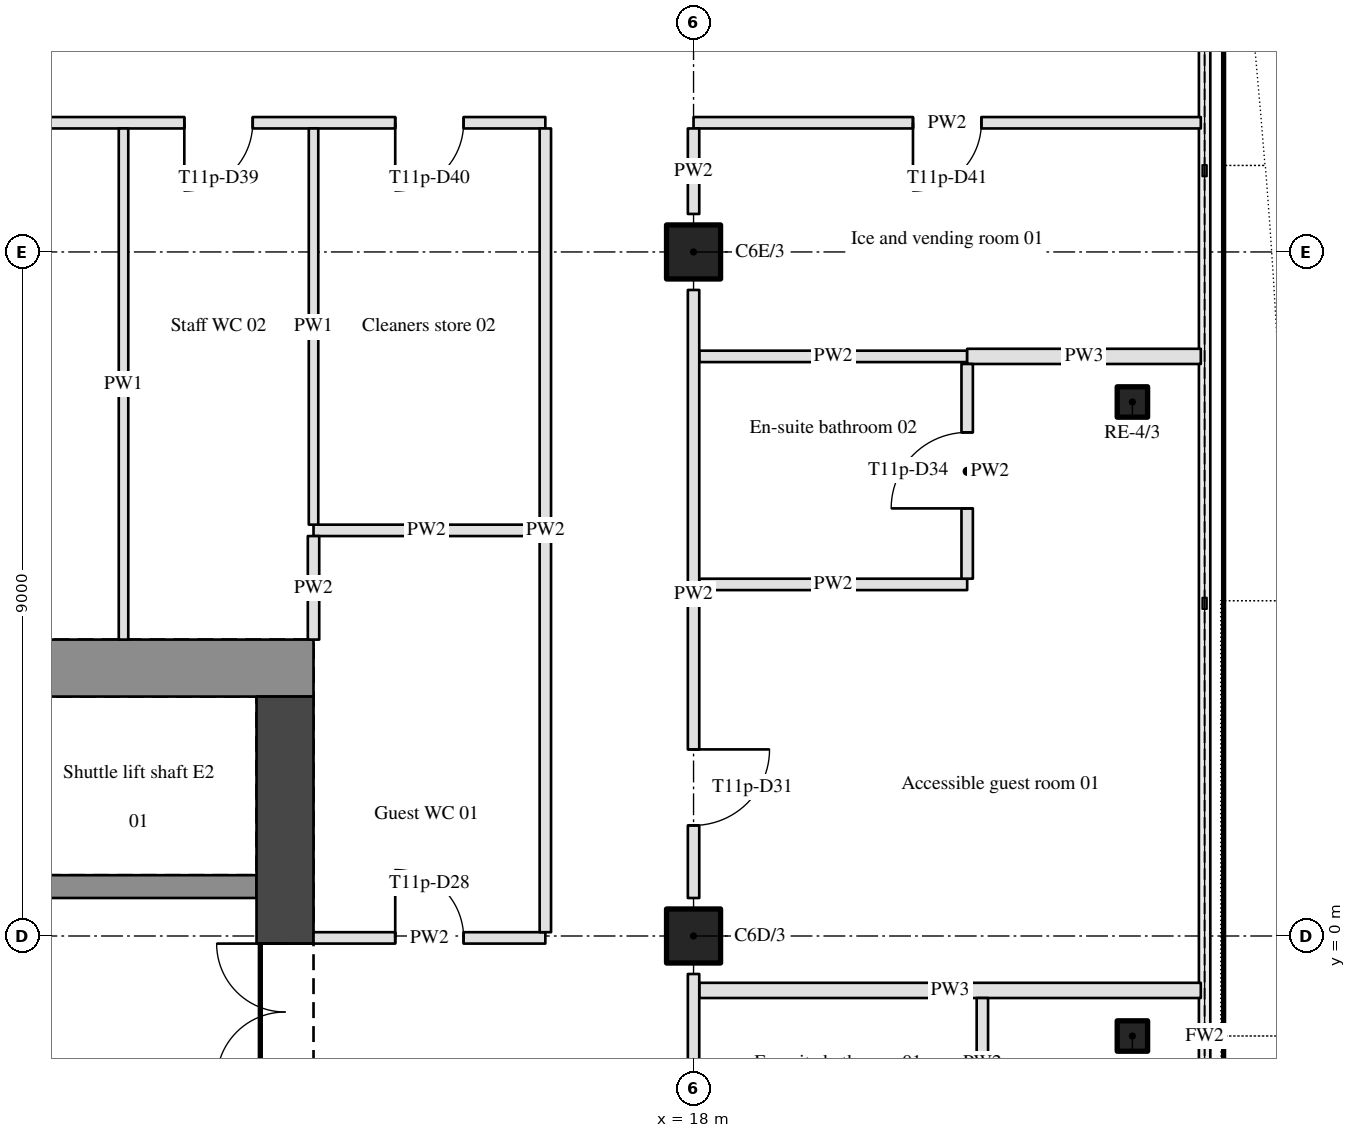
"""IFC4 building model, lengths in metres.
Left out: names, types, materials, properties, quantities, classifications, styles, units other than length and angle.
Written with IfcOpenShell. Run it as: python <this file> out.ifc"""

import sys

from ifc_helpers import new_model, si_unit, direction, frame, frame_2d, origin, origin_2d, place, context, subcontext, project, spatial, rectangle, hollow_rectangle, hollow_circle, extrude, element, fill, save


model = new_model("IFC4")
c1 = context("Model", 3, precision=1e-05, world=origin(), true_north=direction((0.0, 1.0)))
c2 = subcontext(c1, "Body", "Model", "MODEL_VIEW")
j1 = project(units=[si_unit("LENGTHUNIT", "METRE"), si_unit("PLANEANGLEUNIT", "RADIAN")], contexts=[c1])
p1 = place(None, origin())
s1 = spatial("IfcSite", under=j1, at=p1, CompositionType="ELEMENT")
p2 = place(p1, origin())
s2 = spatial("IfcBuilding", under=s1, at=p2, CompositionType="ELEMENT")
p3 = place(p2, frame((0.0, 0.0, 158.9)))
s3 = spatial("IfcBuildingStorey", under=s2, at=p3, CompositionType="ELEMENT", Elevation=158.9)
for number, where, z_axis, x_axis in (
    (1, (18.0, 0.0, 0.0), (0.0, 0.0, 1.0), (1.0, 0.0, 0.0)),
    (2, (18.0, 9.0, 0.0), (0.0, 0.0, 1.0), (1.0, 0.0, 0.0)),
):
    element("IfcColumn", number, at=place(p3, frame(where, z_axis=z_axis, x_axis=x_axis)), inside=s3, PredefinedType="COLUMN", context=c2, shape_type="SweptSolid", body=[
        extrude(hollow_circle(Radius=0.355, WallThickness=0.032, at=origin_2d()), origin(), (0.0, 0.0, 1.0), 3.4),
    ])
for number, where, z_axis, x_axis in (
    (3, (23.774, -1.316, 0.0), (0.0, 0.0, 1.0), (1.0, 0.0, 0.0)),
    (4, (23.774, 7.026, 0.0), (0.0, 0.0, 1.0), (1.0, 0.0, 0.0)),
):
    element("IfcColumn", number, at=place(p3, frame(where, z_axis=z_axis, x_axis=x_axis)), inside=s3, PredefinedType="COLUMN", context=c2, shape_type="SweptSolid", body=[
        extrude(hollow_rectangle(XDim=0.4, YDim=0.4, WallThickness=0.02, InnerFilletRadius=0.03, OuterFilletRadius=0.05, at=origin_2d()), origin(), (0.0, 0.0, 1.0), 3.4),
    ])
p4 = place(p3, frame((-13.0, 3.525, 0.0), z_axis=(0.0, 0.0, 1.0), x_axis=(1.0, 0.0, 0.0)))
e5 = element("IfcWall", 5, at=p4, inside=s3, PredefinedType="SHEAR", context=c2, shape_type="SweptSolid", body=[
    extrude(rectangle(XDim=26.0, YDim=0.75, at=frame_2d((13.0, 0.0))), origin(), (0.0, 0.0, 1.0), 3.4),
])
p5 = place(p3, frame((12.625, -11.5, 0.0), z_axis=(0.0, 0.0, 1.0), x_axis=(0.0, 1.0, 0.0)))
e6 = element("IfcWall", 6, at=p5, inside=s3, PredefinedType="SHEAR", context=c2, shape_type="SweptSolid", body=[
    extrude(rectangle(XDim=14.65, YDim=0.75, at=frame_2d((7.325, 0.0))), origin(), (0.0, 0.0, 1.0), 3.4),
])
p6 = place(p5, frame((9.6, 0.0, 0.0)))
e7 = element("IfcOpeningElement", 7, at=p6, cuts=e6, PredefinedType="OPENING", context=c2, shape_type="SweptSolid", body=[
    extrude(rectangle(XDim=1.8, YDim=2.1, at=frame_2d((0.9, 1.05))), frame((0.0, 0.385, 0.0), z_axis=(0.0, -1.0, 0.0), x_axis=(1.0, 0.0, 0.0)), (0.0, 0.0, 1.0), 0.77),
])
p7 = place(p3, frame((18.075, -0.716, 0.0), z_axis=(0.0, 0.0, 1.0), x_axis=(1.0, 0.0, 0.0)))
e8 = element("IfcWall", 8, at=p7, inside=s3, PredefinedType="PARTITIONING", context=c2, shape_type="SweptSolid", body=[
    extrude(rectangle(XDim=6.599, YDim=0.2, at=frame_2d((3.3, 0.0))), origin(), (0.0, 0.0, 1.0), 2.46),
])
p8 = place(p3, frame((13.0, -0.025, 0.0), z_axis=(0.0, 0.0, 1.0), x_axis=(1.0, 0.0, 0.0)))
e9 = element("IfcWall", 9, at=p8, inside=s3, PredefinedType="PARTITIONING", context=c2, shape_type="SweptSolid", body=[
    extrude(rectangle(XDim=3.05, YDim=0.15, at=frame_2d((1.525, 0.0))), origin(), (0.0, 0.0, 1.0), 2.46),
])
p9 = place(p8, frame((1.075, 0.0, 0.0)))
e10 = element("IfcOpeningElement", 10, at=p9, cuts=e9, PredefinedType="OPENING", context=c2, shape_type="SweptSolid", body=[
    extrude(rectangle(XDim=0.9, YDim=2.1, at=frame_2d((0.45, 1.05))), frame((0.0, 0.085, 0.0), z_axis=(0.0, -1.0, 0.0), x_axis=(1.0, 0.0, 0.0)), (0.0, 0.0, 1.0), 0.17),
])
p10 = place(p3, frame((12.25, 0.65, 0.0), z_axis=(0.0, 0.0, 1.0), x_axis=(-1.0, 0.0, 0.0)))
e11 = element("IfcWall", 11, at=p10, inside=s3, PredefinedType="SHEAR", context=c2, shape_type="SweptSolid", body=[
    extrude(rectangle(XDim=3.25, YDim=0.3, at=frame_2d((1.625, 0.0))), origin(), (0.0, 0.0, 1.0), 3.4),
])
p11 = place(p3, frame((18.075, 4.626, 0.0), z_axis=(0.0, 0.0, 1.0), x_axis=(1.0, 0.0, 0.0)))
e12 = element("IfcWall", 12, at=p11, inside=s3, PredefinedType="PARTITIONING", context=c2, shape_type="SweptSolid", body=[
    extrude(rectangle(XDim=3.525, YDim=0.15, at=frame_2d((1.763, 0.0))), origin(), (0.0, 0.0, 1.0), 2.46),
])
p12 = place(p3, frame((13.0, 5.337, 0.0), z_axis=(0.0, 0.0, 1.0), x_axis=(1.0, 0.0, 0.0)))
e13 = element("IfcWall", 13, at=p12, inside=s3, PredefinedType="PARTITIONING", context=c2, shape_type="SweptSolid", body=[
    extrude(rectangle(XDim=2.975, YDim=0.15, at=frame_2d((1.488, 0.0))), origin(), (0.0, 0.0, 1.0), 2.46),
])
p13 = place(p3, frame((18.075, 7.626, 0.0), z_axis=(0.0, 0.0, 1.0), x_axis=(1.0, 0.0, 0.0)))
e14 = element("IfcWall", 14, at=p13, inside=s3, PredefinedType="PARTITIONING", context=c2, shape_type="SweptSolid", body=[
    extrude(rectangle(XDim=3.525, YDim=0.15, at=frame_2d((1.763, 0.0))), origin(), (0.0, 0.0, 1.0), 2.46),
])
p14 = place(p3, frame((21.6, 7.626, 0.0), z_axis=(0.0, 0.0, 1.0), x_axis=(1.0, 0.0, 0.0)))
e15 = element("IfcWall", 15, at=p14, inside=s3, PredefinedType="PARTITIONING", context=c2, shape_type="SweptSolid", body=[
    extrude(rectangle(XDim=3.074, YDim=0.2, at=frame_2d((1.537, 0.0))), origin(), (0.0, 0.0, 1.0), 2.46),
])
p15 = place(p3, frame((16.05, 10.7, 0.0), z_axis=(0.0, 0.0, 1.0), x_axis=(-1.0, 0.0, 0.0)))
e16 = element("IfcWall", 16, at=p15, inside=s3, PredefinedType="PARTITIONING", context=c2, shape_type="SweptSolid", body=[
    extrude(rectangle(XDim=23.2, YDim=0.15, at=frame_2d((11.6, 0.0))), origin(), (0.0, 0.0, 1.0), 2.46),
])
p16 = place(p15, frame((19.125, 0.0, 0.0)))
e17 = element("IfcOpeningElement", 17, at=p16, cuts=e16, PredefinedType="OPENING", context=c2, shape_type="SweptSolid", body=[
    extrude(rectangle(XDim=1.0, YDim=2.1, at=frame_2d((0.5, 1.05))), frame((0.0, 0.085, 0.0), z_axis=(0.0, -1.0, 0.0), x_axis=(1.0, 0.0, 0.0)), (0.0, 0.0, 1.0), 0.17),
])
p17 = place(p15, frame((10.35, 0.0, 0.0)))
e18 = element("IfcOpeningElement", 18, at=p17, cuts=e16, PredefinedType="OPENING", context=c2, shape_type="SweptSolid", body=[
    extrude(rectangle(XDim=0.9, YDim=2.1, at=frame_2d((0.45, 1.05))), frame((0.0, 0.085, 0.0), z_axis=(0.0, -1.0, 0.0), x_axis=(1.0, 0.0, 0.0)), (0.0, 0.0, 1.0), 0.17),
])
p18 = place(p15, frame((3.85, 0.0, 0.0)))
e19 = element("IfcOpeningElement", 19, at=p18, cuts=e16, PredefinedType="OPENING", context=c2, shape_type="SweptSolid", body=[
    extrude(rectangle(XDim=0.9, YDim=2.1, at=frame_2d((0.45, 1.05))), frame((0.0, 0.085, 0.0), z_axis=(0.0, -1.0, 0.0), x_axis=(1.0, 0.0, 0.0)), (0.0, 0.0, 1.0), 0.17),
])
p19 = place(p15, frame((1.075, 0.0, 0.0)))
e20 = element("IfcOpeningElement", 20, at=p19, cuts=e16, PredefinedType="OPENING", context=c2, shape_type="SweptSolid", body=[
    extrude(rectangle(XDim=0.9, YDim=2.1, at=frame_2d((0.45, 1.05))), frame((0.0, 0.085, 0.0), z_axis=(0.0, -1.0, 0.0), x_axis=(1.0, 0.0, 0.0)), (0.0, 0.0, 1.0), 0.17),
])
p20 = place(p3, frame((24.674, 10.7, 0.0), z_axis=(0.0, 0.0, 1.0), x_axis=(-1.0, 0.0, 0.0)))
e21 = element("IfcWall", 21, at=p20, inside=s3, PredefinedType="PARTITIONING", context=c2, shape_type="SweptSolid", body=[
    extrude(rectangle(XDim=6.674, YDim=0.15, at=frame_2d((3.337, 0.0))), origin(), (0.0, 0.0, 1.0), 2.46),
])
p21 = place(p20, frame((2.887, 0.0, 0.0)))
e22 = element("IfcOpeningElement", 22, at=p21, cuts=e21, PredefinedType="OPENING", context=c2, shape_type="SweptSolid", body=[
    extrude(rectangle(XDim=0.9, YDim=2.1, at=frame_2d((0.45, 1.05))), frame((0.0, 0.085, 0.0), z_axis=(0.0, -1.0, 0.0), x_axis=(1.0, 0.0, 0.0)), (0.0, 0.0, 1.0), 0.17),
])
p22 = place(p3, frame((10.5, 3.9, 0.0), z_axis=(0.0, 0.0, 1.0), x_axis=(0.0, 1.0, 0.0)))
e23 = element("IfcWall", 23, at=p22, inside=s3, PredefinedType="PARTITIONING", context=c2, shape_type="SweptSolid", body=[
    extrude(rectangle(XDim=6.725, YDim=0.125, at=frame_2d((3.363, 0.0))), origin(), (0.0, 0.0, 1.0), 2.46),
])
p23 = place(p3, frame((13.0, 3.9, 0.0), z_axis=(0.0, 0.0, 1.0), x_axis=(0.0, 1.0, 0.0)))
e24 = element("IfcWall", 24, at=p23, inside=s3, PredefinedType="PARTITIONING", context=c2, shape_type="SweptSolid", body=[
    extrude(rectangle(XDim=1.362, YDim=0.15, at=frame_2d((0.681, 0.0))), origin(), (0.0, 0.0, 1.0), 2.46),
])
p24 = place(p3, frame((13.0, 5.412, 0.0), z_axis=(0.0, 0.0, 1.0), x_axis=(0.0, 1.0, 0.0)))
e25 = element("IfcWall", 25, at=p24, inside=s3, PredefinedType="PARTITIONING", context=c2, shape_type="SweptSolid", body=[
    extrude(rectangle(XDim=5.213, YDim=0.125, at=frame_2d((2.606, 0.0))), origin(), (0.0, 0.0, 1.0), 2.46),
])
p25 = place(p3, frame((16.05, 0.05, 0.0), z_axis=(0.0, 0.0, 1.0), x_axis=(0.0, 1.0, 0.0)))
e26 = element("IfcWall", 26, at=p25, inside=s3, PredefinedType="PARTITIONING", context=c2, shape_type="SweptSolid", body=[
    extrude(rectangle(XDim=10.575, YDim=0.15, at=frame_2d((5.288, 0.0))), origin(), (0.0, 0.0, 1.0), 2.46),
])
p26 = place(p3, frame((18.0, -0.5, 0.0), z_axis=(0.0, 0.0, 1.0), x_axis=(0.0, -1.0, 0.0)))
e27 = element("IfcWall", 27, at=p26, inside=s3, PredefinedType="PARTITIONING", context=c2, shape_type="SweptSolid", body=[
    extrude(rectangle(XDim=8.0, YDim=0.15, at=frame_2d((4.0, 0.0))), origin(), (0.0, 0.0, 1.0), 2.46),
])
p27 = place(p26, frame((5.448, 0.0, 0.0)))
e28 = element("IfcOpeningElement", 28, at=p27, cuts=e27, PredefinedType="OPENING", context=c2, shape_type="SweptSolid", body=[
    extrude(rectangle(XDim=1.8, YDim=2.1, at=frame_2d((0.9, 1.05))), frame((0.0, 0.085, 0.0), z_axis=(0.0, -1.0, 0.0), x_axis=(1.0, 0.0, 0.0)), (0.0, 0.0, 1.0), 0.17),
])
p28 = place(p3, frame((18.0, 8.5, 0.0), z_axis=(0.0, 0.0, 1.0), x_axis=(0.0, -1.0, 0.0)))
e29 = element("IfcWall", 29, at=p28, inside=s3, PredefinedType="PARTITIONING", context=c2, shape_type="SweptSolid", body=[
    extrude(rectangle(XDim=8.0, YDim=0.15, at=frame_2d((4.0, 0.0))), origin(), (0.0, 0.0, 1.0), 2.46),
])
p29 = place(p28, frame((6.045, 0.0, 0.0)))
e30 = element("IfcOpeningElement", 30, at=p29, cuts=e29, PredefinedType="OPENING", context=c2, shape_type="SweptSolid", body=[
    extrude(rectangle(XDim=1.0, YDim=2.1, at=frame_2d((0.5, 1.05))), frame((0.0, 0.085, 0.0), z_axis=(0.0, -1.0, 0.0), x_axis=(1.0, 0.0, 0.0)), (0.0, 0.0, 1.0), 0.17),
])
p30 = place(p3, frame((18.0, 9.5, 0.0), z_axis=(0.0, 0.0, 1.0), x_axis=(0.0, 1.0, 0.0)))
e31 = element("IfcWall", 31, at=p30, inside=s3, PredefinedType="PARTITIONING", context=c2, shape_type="SweptSolid", body=[
    extrude(rectangle(XDim=1.125, YDim=0.15, at=frame_2d((0.562, 0.0))), origin(), (0.0, 0.0, 1.0), 2.46),
])
p31 = place(p3, frame((21.6, 4.701, 0.0), z_axis=(0.0, 0.0, 1.0), x_axis=(0.0, 1.0, 0.0)))
e32 = element("IfcWall", 32, at=p31, inside=s3, PredefinedType="PARTITIONING", context=c2, shape_type="SweptSolid", body=[
    extrude(rectangle(XDim=2.825, YDim=0.15, at=frame_2d((1.413, 0.0))), origin(), (0.0, 0.0, 1.0), 2.46),
])
p32 = place(p31, frame((0.925, 0.0, 0.0)))
e33 = element("IfcOpeningElement", 33, at=p32, cuts=e32, PredefinedType="OPENING", context=c2, shape_type="SweptSolid", body=[
    extrude(rectangle(XDim=1.0, YDim=2.1, at=frame_2d((0.5, 1.05))), frame((0.0, 0.085, 0.0), z_axis=(0.0, -1.0, 0.0), x_axis=(1.0, 0.0, 0.0)), (0.0, 0.0, 1.0), 0.17),
])
p33 = place(p3, frame((21.8, -3.641, 0.0), z_axis=(0.0, 0.0, 1.0), x_axis=(0.0, 1.0, 0.0)))
e34 = element("IfcWall", 34, at=p33, inside=s3, PredefinedType="PARTITIONING", context=c2, shape_type="SweptSolid", body=[
    extrude(rectangle(XDim=2.825, YDim=0.15, at=frame_2d((1.413, 0.0))), origin(), (0.0, 0.0, 1.0), 2.46),
])
p34 = place(p33, frame((0.975, 0.0, 0.0)))
e35 = element("IfcOpeningElement", 35, at=p34, cuts=e34, PredefinedType="OPENING", context=c2, shape_type="SweptSolid", body=[
    extrude(rectangle(XDim=0.9, YDim=2.1, at=frame_2d((0.45, 1.05))), frame((0.0, 0.085, 0.0), z_axis=(0.0, -1.0, 0.0), x_axis=(1.0, 0.0, 0.0)), (0.0, 0.0, 1.0), 0.17),
])
p35 = place(p6, origin())
e36 = element("IfcDoor", 36, at=p35, inside=s3, OperationType="DOUBLE_DOOR_SINGLE_SWING", PredefinedType="DOOR", context=c2, shape_type="SweptSolid", body=[
    extrude(rectangle(XDim=1.8, YDim=2.1, at=frame_2d((0.9, 1.05))), frame((0.0, 0.025, 0.0), z_axis=(0.0, -1.0, 0.0), x_axis=(1.0, 0.0, 0.0)), (0.0, 0.0, 1.0), 0.05),
])
fill(e7, e36)
p36 = place(p18, origin())
e37 = element("IfcDoor", 37, at=p36, inside=s3, OperationType="SINGLE_SWING_RIGHT", PredefinedType="DOOR", context=c2, shape_type="SweptSolid", body=[
    extrude(rectangle(XDim=0.9, YDim=2.1, at=frame_2d((0.45, 1.05))), frame((0.0, 0.025, 0.0), z_axis=(0.0, -1.0, 0.0), x_axis=(1.0, 0.0, 0.0)), (0.0, 0.0, 1.0), 0.05),
])
fill(e19, e37)
p37 = place(p29, origin())
e38 = element("IfcDoor", 38, at=p37, inside=s3, OperationType="SINGLE_SWING_LEFT", PredefinedType="DOOR", context=c2, shape_type="SweptSolid", body=[
    extrude(rectangle(XDim=1.0, YDim=2.1, at=frame_2d((0.5, 1.05))), frame((0.0, 0.025, 0.0), z_axis=(0.0, -1.0, 0.0), x_axis=(1.0, 0.0, 0.0)), (0.0, 0.0, 1.0), 0.05),
])
fill(e30, e38)
p38 = place(p21, origin())
e39 = element("IfcDoor", 39, at=p38, inside=s3, OperationType="SINGLE_SWING_RIGHT", PredefinedType="DOOR", context=c2, shape_type="SweptSolid", body=[
    extrude(rectangle(XDim=0.9, YDim=2.1, at=frame_2d((0.45, 1.05))), frame((0.0, 0.025, 0.0), z_axis=(0.0, -1.0, 0.0), x_axis=(1.0, 0.0, 0.0)), (0.0, 0.0, 1.0), 0.05),
])
fill(e22, e39)
p39 = place(p9, origin())
e40 = element("IfcDoor", 40, at=p39, inside=s3, OperationType="SINGLE_SWING_LEFT", PredefinedType="DOOR", context=c2, shape_type="SweptSolid", body=[
    extrude(rectangle(XDim=0.9, YDim=2.1, at=frame_2d((0.45, 1.05))), frame((0.0, 0.025, 0.0), z_axis=(0.0, -1.0, 0.0), x_axis=(1.0, 0.0, 0.0)), (0.0, 0.0, 1.0), 0.05),
])
fill(e10, e40)
p40 = place(p19, origin())
e41 = element("IfcDoor", 41, at=p40, inside=s3, OperationType="SINGLE_SWING_RIGHT", PredefinedType="DOOR", context=c2, shape_type="SweptSolid", body=[
    extrude(rectangle(XDim=0.9, YDim=2.1, at=frame_2d((0.45, 1.05))), frame((0.0, 0.025, 0.0), z_axis=(0.0, -1.0, 0.0), x_axis=(1.0, 0.0, 0.0)), (0.0, 0.0, 1.0), 0.05),
])
fill(e20, e41)
p41 = place(p32, origin())
e42 = element("IfcDoor", 42, at=p41, inside=s3, OperationType="SINGLE_SWING_LEFT", PredefinedType="DOOR", context=c2, shape_type="SweptSolid", body=[
    extrude(rectangle(XDim=1.0, YDim=2.1, at=frame_2d((0.5, 1.05))), frame((0.0, 0.025, 0.0), z_axis=(0.0, -1.0, 0.0), x_axis=(1.0, 0.0, 0.0)), (0.0, 0.0, 1.0), 0.05),
])
fill(e33, e42)
save(model, sys.argv[1])
